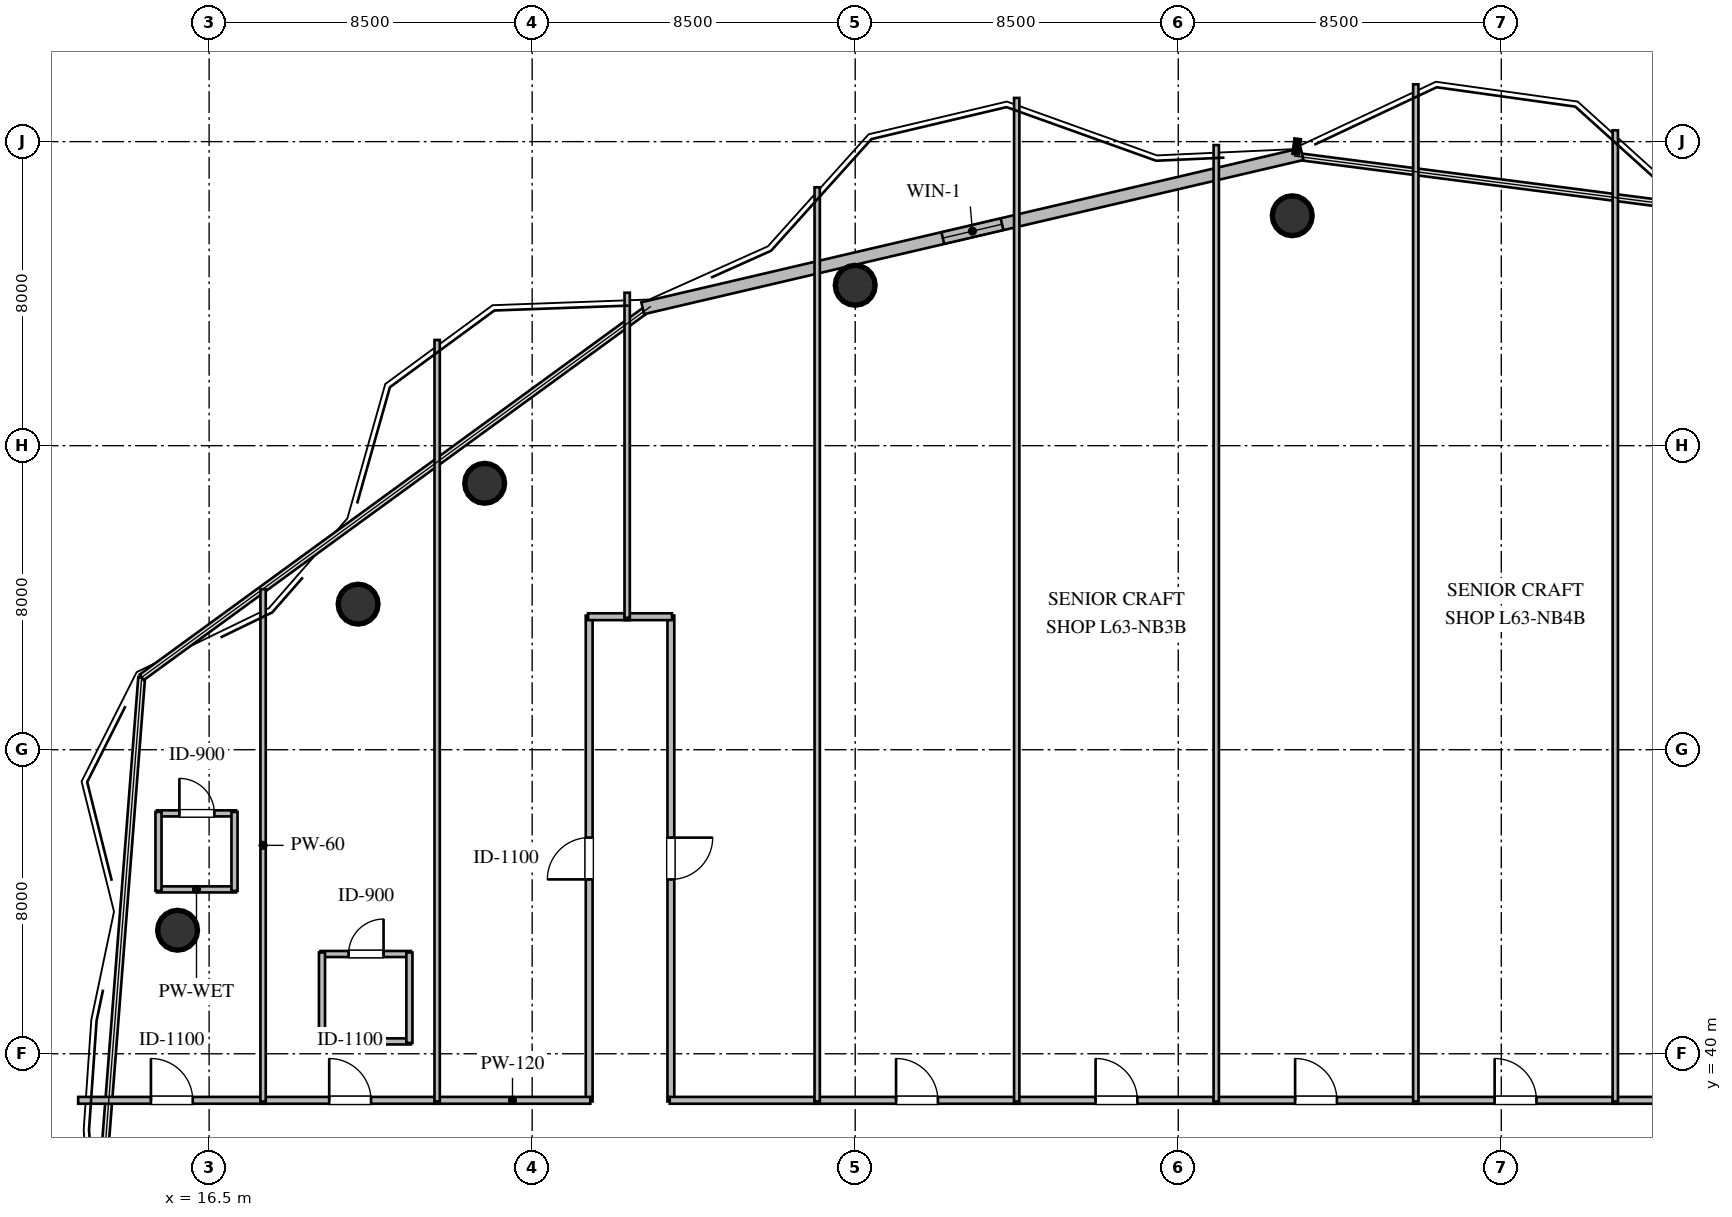
"""IFC4 building model, lengths in metres.
Left out: names, types, materials, properties, quantities, classifications, styles, units other than length and angle.
Written with IfcOpenShell. Run it as: python <this file> out.ifc"""

import sys

from ifc_helpers import new_model, si_unit, direction, frame, frame_2d, origin, origin_2d, place, context, subcontext, project, spatial, rectangle, circle, extrude, element, fill, save


model = new_model("IFC4")
c1 = context("Model", 3, precision=1e-05, world=origin(), true_north=direction((0.0, 1.0)))
c2 = subcontext(c1, "Body", "Model", "MODEL_VIEW")
j1 = project(units=[si_unit("LENGTHUNIT", "METRE"), si_unit("PLANEANGLEUNIT", "RADIAN")], contexts=[c1])
p1 = place(None, origin())
s1 = spatial("IfcSite", under=j1, at=p1, CompositionType="ELEMENT")
p2 = place(p1, origin())
s2 = spatial("IfcBuilding", under=s1, at=p2, CompositionType="ELEMENT")
p3 = place(p2, frame((0.0, 0.0, 238.8)))
s3 = spatial("IfcBuildingStorey", under=s2, at=p3, CompositionType="ELEMENT", Elevation=238.8)
for number, where, z_axis, x_axis in (
    (1, (45.0, 62.05, 0.0), (0.0, 0.0, 1.0), (1.0, 0.0, 0.0)),
    (2, (33.5, 60.22, 0.0), (0.0, 0.0, 1.0), (1.0, 0.0, 0.0)),
    (3, (23.75, 55.01, 0.0), (0.0, 0.0, 1.0), (1.0, 0.0, 0.0)),
    (4, (20.42, 51.83, 0.0), (0.0, 0.0, 1.0), (1.0, 0.0, 0.0)),
    (5, (15.67, 43.25, 0.0), (0.0, 0.0, 1.0), (1.0, 0.0, 0.0)),
):
    element("IfcColumn", number, at=place(p3, frame(where, z_axis=z_axis, x_axis=x_axis)), inside=s3, PredefinedType="COLUMN", context=c2, shape_type="SweptSolid", body=[
        extrude(circle(Radius=0.525, at=origin_2d()), origin(), (0.0, 0.0, 1.0), 3.6),
    ])
p4 = place(p3, frame((27.909, 59.617, 0.0), z_axis=(0.0, 0.0, 1.0), x_axis=(0.973753606594, 0.227604731158, 0.0)))
e6 = element("IfcWall", 6, at=p4, inside=s3, PredefinedType="STANDARD", context=c2, shape_type="SweptSolid", body=[
    extrude(rectangle(XDim=17.817, YDim=0.32, at=frame_2d((8.908, 0.0))), origin(), (0.0, 0.0, 1.0), 3.36),
])
p5 = place(p4, frame((8.109, 0.0, 1.05)))
e7 = element("IfcOpeningElement", 7, at=p5, cuts=e6, PredefinedType="OPENING", context=c2, shape_type="SweptSolid", body=[
    extrude(rectangle(XDim=1.6, YDim=1.5, at=frame_2d((0.8, 0.75))), frame((0.0, 0.17, 0.0), z_axis=(0.0, -1.0, 0.0), x_axis=(1.0, 0.0, 0.0)), (0.0, 0.0, 1.0), 0.34),
])
p6 = place(p3, frame((15.128, 44.325, 0.0), z_axis=(0.0, 0.0, 1.0), x_axis=(1.0, 0.0, 0.0)))
e8 = element("IfcWall", 8, at=p6, inside=s3, PredefinedType="PLUMBINGWALL", context=c2, shape_type="SweptSolid", body=[
    extrude(rectangle(XDim=2.08, YDim=0.16, at=frame_2d((1.04, 0.0))), origin(), (0.0, 0.0, 1.0), 3.36),
])
p7 = place(p3, frame((15.128, 46.325, 0.0), z_axis=(0.0, 0.0, 1.0), x_axis=(1.0, 0.0, 0.0)))
e9 = element("IfcWall", 9, at=p7, inside=s3, PredefinedType="PLUMBINGWALL", context=c2, shape_type="SweptSolid", body=[
    extrude(rectangle(XDim=2.08, YDim=0.16, at=frame_2d((1.04, 0.0))), origin(), (0.0, 0.0, 1.0), 3.36),
])
p8 = place(p7, frame((0.59, 0.0, 0.0)))
e10 = element("IfcOpeningElement", 10, at=p8, cuts=e9, PredefinedType="OPENING", context=c2, shape_type="SweptSolid", body=[
    extrude(rectangle(XDim=0.92, YDim=2.1, at=frame_2d((0.46, 1.05))), frame((0.0, 0.09, 0.0), z_axis=(0.0, -1.0, 0.0), x_axis=(1.0, 0.0, 0.0)), (0.0, 0.0, 1.0), 0.18),
])
for number, where, z_axis, x_axis in (
    (11, (15.168, 44.285, 0.0), (0.0, 0.0, 1.0), (0.0, 1.0, 0.0)),
    (12, (17.168, 44.285, 0.0), (0.0, 0.0, 1.0), (0.0, 1.0, 0.0)),
):
    element("IfcWall", number, at=place(p3, frame(where, z_axis=z_axis, x_axis=x_axis)), inside=s3, PredefinedType="PLUMBINGWALL", context=c2, shape_type="SweptSolid", body=[
        extrude(rectangle(XDim=2.08, YDim=0.16, at=frame_2d((1.04, 0.0))), origin(), (0.0, 0.0, 1.0), 3.36),
    ])
p9 = place(p3, frame((19.43, 40.325, 0.0), z_axis=(0.0, 0.0, 1.0), x_axis=(1.0, 0.0, 0.0)))
e13 = element("IfcWall", 13, at=p9, inside=s3, PredefinedType="PLUMBINGWALL", context=c2, shape_type="SweptSolid", body=[
    extrude(rectangle(XDim=2.38, YDim=0.16, at=frame_2d((1.19, 0.0))), origin(), (0.0, 0.0, 1.0), 3.36),
])
p10 = place(p3, frame((19.43, 42.625, 0.0), z_axis=(0.0, 0.0, 1.0), x_axis=(1.0, 0.0, 0.0)))
e14 = element("IfcWall", 14, at=p10, inside=s3, PredefinedType="PLUMBINGWALL", context=c2, shape_type="SweptSolid", body=[
    extrude(rectangle(XDim=2.38, YDim=0.16, at=frame_2d((1.19, 0.0))), origin(), (0.0, 0.0, 1.0), 3.36),
])
p11 = place(p10, frame((0.74, 0.0, 0.0)))
e15 = element("IfcOpeningElement", 15, at=p11, cuts=e14, PredefinedType="OPENING", context=c2, shape_type="SweptSolid", body=[
    extrude(rectangle(XDim=0.92, YDim=2.1, at=frame_2d((0.46, 1.05))), frame((0.0, 0.09, 0.0), z_axis=(0.0, -1.0, 0.0), x_axis=(1.0, 0.0, 0.0)), (0.0, 0.0, 1.0), 0.18),
])
p12 = place(p3, frame((19.47, 40.285, 0.0), z_axis=(0.0, 0.0, 1.0), x_axis=(0.0, 1.0, 0.0)))
e16 = element("IfcWall", 16, at=p12, inside=s3, PredefinedType="PLUMBINGWALL", context=c2, shape_type="SweptSolid", body=[
    extrude(rectangle(XDim=2.38, YDim=0.16, at=frame_2d((1.19, 0.0))), origin(), (0.0, 0.0, 1.0), 3.36),
])
p13 = place(p3, frame((21.77, 40.285, 0.0), z_axis=(0.0, 0.0, 1.0), x_axis=(0.0, 1.0, 0.0)))
e17 = element("IfcWall", 17, at=p13, inside=s3, PredefinedType="PLUMBINGWALL", context=c2, shape_type="SweptSolid", body=[
    extrude(rectangle(XDim=2.38, YDim=0.16, at=frame_2d((1.19, 0.0))), origin(), (0.0, 0.0, 1.0), 2.89),
])
p14 = place(p3, frame((13.054, 38.775, 0.0), z_axis=(0.0, 0.0, 1.0), x_axis=(1.0, 0.0, 0.0)))
e18 = element("IfcWall", 18, at=p14, inside=s3, PredefinedType="PARTITIONING", context=c2, shape_type="SweptSolid", body=[
    extrude(rectangle(XDim=4.931, YDim=0.18, at=frame_2d((2.466, 0.0))), origin(), (0.0, 0.0, 1.0), 3.36),
])
p15 = place(p14, frame((1.915, 0.0, 0.0)))
e19 = element("IfcOpeningElement", 19, at=p15, cuts=e18, PredefinedType="OPENING", context=c2, shape_type="SweptSolid", body=[
    extrude(rectangle(XDim=1.1, YDim=2.1, at=frame_2d((0.55, 1.05))), frame((0.0, 0.1, 0.0), z_axis=(0.0, -1.0, 0.0), x_axis=(1.0, 0.0, 0.0)), (0.0, 0.0, 1.0), 0.2),
])
p16 = place(p3, frame((17.855, 38.775, 0.0), z_axis=(0.0, 0.0, 1.0), x_axis=(1.0, 0.0, 0.0)))
e20 = element("IfcWall", 20, at=p16, inside=s3, PredefinedType="PARTITIONING", context=c2, shape_type="SweptSolid", body=[
    extrude(rectangle(XDim=4.71, YDim=0.18, at=frame_2d((2.355, 0.0))), origin(), (0.0, 0.0, 1.0), 3.36),
])
p17 = place(p16, frame((1.805, 0.0, 0.0)))
e21 = element("IfcOpeningElement", 21, at=p17, cuts=e20, PredefinedType="OPENING", context=c2, shape_type="SweptSolid", body=[
    extrude(rectangle(XDim=1.1, YDim=2.1, at=frame_2d((0.55, 1.05))), frame((0.0, 0.1, 0.0), z_axis=(0.0, -1.0, 0.0), x_axis=(1.0, 0.0, 0.0)), (0.0, 0.0, 1.0), 0.2),
])
p18 = place(p3, frame((26.5, 38.745, 0.0), z_axis=(0.0, 0.0, 1.0), x_axis=(0.0, 1.0, 0.0)))
e22 = element("IfcWall", 22, at=p18, inside=s3, PredefinedType="PARTITIONING", context=c2, shape_type="SweptSolid", body=[
    extrude(rectangle(XDim=12.785, YDim=0.18, at=frame_2d((6.393, 0.0))), origin(), (0.0, 0.0, 1.0), 3.36),
])
p19 = place(p18, frame((5.843, 0.0, 0.0)))
e23 = element("IfcOpeningElement", 23, at=p19, cuts=e22, PredefinedType="OPENING", context=c2, shape_type="SweptSolid", body=[
    extrude(rectangle(XDim=1.1, YDim=2.1, at=frame_2d((0.55, 1.05))), frame((0.0, 0.1, 0.0), z_axis=(0.0, -1.0, 0.0), x_axis=(1.0, 0.0, 0.0)), (0.0, 0.0, 1.0), 0.2),
])
p20 = place(p3, frame((22.435, 38.775, 0.0), z_axis=(0.0, 0.0, 1.0), x_axis=(1.0, 0.0, 0.0)))
e24 = element("IfcWall", 24, at=p20, inside=s3, PredefinedType="PARTITIONING", context=c2, shape_type="SweptSolid", body=[
    extrude(rectangle(XDim=4.095, YDim=0.18, at=frame_2d((2.047, 0.0))), origin(), (0.0, 0.0, 1.0), 3.36),
])
p21 = place(p3, frame((26.47, 51.5, 0.0), z_axis=(0.0, 0.0, 1.0), x_axis=(1.0, 0.0, 0.0)))
e25 = element("IfcWall", 25, at=p21, inside=s3, PredefinedType="PARTITIONING", context=c2, shape_type="SweptSolid", body=[
    extrude(rectangle(XDim=1.095, YDim=0.18, at=frame_2d((0.547, 0.0))), origin(), (0.0, 0.0, 1.0), 3.36),
])
p22 = place(p3, frame((28.65, 51.53, 0.0), z_axis=(0.0, 0.0, 1.0), x_axis=(0.0, -1.0, 0.0)))
e26 = element("IfcWall", 26, at=p22, inside=s3, PredefinedType="PARTITIONING", context=c2, shape_type="SweptSolid", body=[
    extrude(rectangle(XDim=12.785, YDim=0.18, at=frame_2d((6.393, 0.0))), origin(), (0.0, 0.0, 1.0), 3.36),
])
p23 = place(p22, frame((5.843, 0.0, 0.0)))
e27 = element("IfcOpeningElement", 27, at=p23, cuts=e26, PredefinedType="OPENING", context=c2, shape_type="SweptSolid", body=[
    extrude(rectangle(XDim=1.1, YDim=2.1, at=frame_2d((0.55, 1.05))), frame((0.0, 0.1, 0.0), z_axis=(0.0, -1.0, 0.0), x_axis=(1.0, 0.0, 0.0)), (0.0, 0.0, 1.0), 0.2),
])
p24 = place(p3, frame((28.62, 38.775, 0.0), z_axis=(0.0, 0.0, 1.0), x_axis=(1.0, 0.0, 0.0)))
e28 = element("IfcWall", 28, at=p24, inside=s3, PredefinedType="PARTITIONING", context=c2, shape_type="SweptSolid", body=[
    extrude(rectangle(XDim=3.945, YDim=0.18, at=frame_2d((1.972, 0.0))), origin(), (0.0, 0.0, 1.0), 3.36),
])
p25 = place(p3, frame((27.435, 51.5, 0.0), z_axis=(0.0, 0.0, 1.0), x_axis=(1.0, 0.0, 0.0)))
e29 = element("IfcWall", 29, at=p25, inside=s3, PredefinedType="PARTITIONING", context=c2, shape_type="SweptSolid", body=[
    extrude(rectangle(XDim=1.245, YDim=0.18, at=frame_2d((0.623, 0.0))), origin(), (0.0, 0.0, 1.0), 3.36),
])
p26 = place(p3, frame((32.435, 38.775, 0.0), z_axis=(0.0, 0.0, 1.0), x_axis=(1.0, 0.0, 0.0)))
e30 = element("IfcWall", 30, at=p26, inside=s3, PredefinedType="PARTITIONING", context=c2, shape_type="SweptSolid", body=[
    extrude(rectangle(XDim=5.38, YDim=0.18, at=frame_2d((2.69, 0.0))), origin(), (0.0, 0.0, 1.0), 3.36),
])
p27 = place(p26, frame((2.14, 0.0, 0.0)))
e31 = element("IfcOpeningElement", 31, at=p27, cuts=e30, PredefinedType="OPENING", context=c2, shape_type="SweptSolid", body=[
    extrude(rectangle(XDim=1.1, YDim=2.1, at=frame_2d((0.55, 1.05))), frame((0.0, 0.1, 0.0), z_axis=(0.0, -1.0, 0.0), x_axis=(1.0, 0.0, 0.0)), (0.0, 0.0, 1.0), 0.2),
])
p28 = place(p3, frame((37.685, 38.775, 0.0), z_axis=(0.0, 0.0, 1.0), x_axis=(1.0, 0.0, 0.0)))
e32 = element("IfcWall", 32, at=p28, inside=s3, PredefinedType="PARTITIONING", context=c2, shape_type="SweptSolid", body=[
    extrude(rectangle(XDim=5.38, YDim=0.18, at=frame_2d((2.69, 0.0))), origin(), (0.0, 0.0, 1.0), 3.36),
])
p29 = place(p28, frame((2.14, 0.0, 0.0)))
e33 = element("IfcOpeningElement", 33, at=p29, cuts=e32, PredefinedType="OPENING", context=c2, shape_type="SweptSolid", body=[
    extrude(rectangle(XDim=1.1, YDim=2.1, at=frame_2d((0.55, 1.05))), frame((0.0, 0.1, 0.0), z_axis=(0.0, -1.0, 0.0), x_axis=(1.0, 0.0, 0.0)), (0.0, 0.0, 1.0), 0.2),
])
p30 = place(p3, frame((42.935, 38.775, 0.0), z_axis=(0.0, 0.0, 1.0), x_axis=(1.0, 0.0, 0.0)))
e34 = element("IfcWall", 34, at=p30, inside=s3, PredefinedType="PARTITIONING", context=c2, shape_type="SweptSolid", body=[
    extrude(rectangle(XDim=5.38, YDim=0.18, at=frame_2d((2.69, 0.0))), origin(), (0.0, 0.0, 1.0), 3.36),
])
p31 = place(p30, frame((2.14, 0.0, 0.0)))
e35 = element("IfcOpeningElement", 35, at=p31, cuts=e34, PredefinedType="OPENING", context=c2, shape_type="SweptSolid", body=[
    extrude(rectangle(XDim=1.1, YDim=2.1, at=frame_2d((0.55, 1.05))), frame((0.0, 0.1, 0.0), z_axis=(0.0, -1.0, 0.0), x_axis=(1.0, 0.0, 0.0)), (0.0, 0.0, 1.0), 0.2),
])
p32 = place(p3, frame((48.185, 38.775, 0.0), z_axis=(0.0, 0.0, 1.0), x_axis=(1.0, 0.0, 0.0)))
e36 = element("IfcWall", 36, at=p32, inside=s3, PredefinedType="PARTITIONING", context=c2, shape_type="SweptSolid", body=[
    extrude(rectangle(XDim=5.38, YDim=0.18, at=frame_2d((2.69, 0.0))), origin(), (0.0, 0.0, 1.0), 3.36),
])
p33 = place(p32, frame((2.14, 0.0, 0.0)))
e37 = element("IfcOpeningElement", 37, at=p33, cuts=e36, PredefinedType="OPENING", context=c2, shape_type="SweptSolid", body=[
    extrude(rectangle(XDim=1.1, YDim=2.1, at=frame_2d((0.55, 1.05))), frame((0.0, 0.1, 0.0), z_axis=(0.0, -1.0, 0.0), x_axis=(1.0, 0.0, 0.0)), (0.0, 0.0, 1.0), 0.2),
])
p34 = place(p3, frame((53.435, 38.775, 0.0), z_axis=(0.0, 0.0, 1.0), x_axis=(1.0, 0.0, 0.0)))
e38 = element("IfcWall", 38, at=p34, inside=s3, PredefinedType="PARTITIONING", context=c2, shape_type="SweptSolid", body=[
    extrude(rectangle(XDim=4.88, YDim=0.18, at=frame_2d((2.44, 0.0))), origin(), (0.0, 0.0, 1.0), 3.36),
])
p35 = place(p34, frame((1.89, 0.0, 0.0)))
e39 = element("IfcOpeningElement", 39, at=p35, cuts=e38, PredefinedType="OPENING", context=c2, shape_type="SweptSolid", body=[
    extrude(rectangle(XDim=1.1, YDim=2.1, at=frame_2d((0.55, 1.05))), frame((0.0, 0.1, 0.0), z_axis=(0.0, -1.0, 0.0), x_axis=(1.0, 0.0, 0.0)), (0.0, 0.0, 1.0), 0.2),
])
p36 = place(p3, frame((17.92, 52.222, 0.0), z_axis=(0.0, 0.0, 1.0), x_axis=(0.0, -1.0, 0.0)))
e40 = element("IfcWall", 40, at=p36, inside=s3, PredefinedType="PARTITIONING", context=c2, shape_type="SweptSolid", body=[
    extrude(rectangle(XDim=13.477, YDim=0.14, at=frame_2d((6.739, 0.0))), origin(), (0.0, 0.0, 1.0), 3.36),
])
p37 = place(p3, frame((22.5, 58.782, 0.0), z_axis=(0.0, 0.0, 1.0), x_axis=(0.0, -1.0, 0.0)))
e41 = element("IfcWall", 41, at=p37, inside=s3, PredefinedType="PARTITIONING", context=c2, shape_type="SweptSolid", body=[
    extrude(rectangle(XDim=20.037, YDim=0.14, at=frame_2d((10.019, 0.0))), origin(), (0.0, 0.0, 1.0), 2.89),
])
p38 = place(p3, frame((27.5, 60.024, 0.0), z_axis=(0.0, 0.0, 1.0), x_axis=(0.0, -1.0, 0.0)))
e42 = element("IfcWall", 42, at=p38, inside=s3, PredefinedType="PARTITIONING", context=c2, shape_type="SweptSolid", body=[
    extrude(rectangle(XDim=8.554, YDim=0.14, at=frame_2d((4.277, 0.0))), origin(), (0.0, 0.0, 1.0), 3.36),
])
p39 = place(p3, frame((32.5, 62.799, 0.0), z_axis=(0.0, 0.0, 1.0), x_axis=(0.0, -1.0, 0.0)))
e43 = element("IfcWall", 43, at=p39, inside=s3, PredefinedType="PARTITIONING", context=c2, shape_type="SweptSolid", body=[
    extrude(rectangle(XDim=24.054, YDim=0.14, at=frame_2d((12.027, 0.0))), origin(), (0.0, 0.0, 1.0), 3.36),
])
p40 = place(p3, frame((37.75, 65.15, 0.0), z_axis=(0.0, 0.0, 1.0), x_axis=(0.0, -1.0, 0.0)))
e44 = element("IfcWall", 44, at=p40, inside=s3, PredefinedType="PARTITIONING", context=c2, shape_type="SweptSolid", body=[
    extrude(rectangle(XDim=26.405, YDim=0.14, at=frame_2d((13.202, 0.0))), origin(), (0.0, 0.0, 1.0), 3.36),
])
p41 = place(p3, frame((43.0, 63.909, 0.0), z_axis=(0.0, 0.0, 1.0), x_axis=(0.0, -1.0, 0.0)))
e45 = element("IfcWall", 45, at=p41, inside=s3, PredefinedType="PARTITIONING", context=c2, shape_type="SweptSolid", body=[
    extrude(rectangle(XDim=25.164, YDim=0.14, at=frame_2d((12.582, 0.0))), origin(), (0.0, 0.0, 1.0), 3.36),
])
p42 = place(p3, frame((48.25, 65.508, 0.0), z_axis=(0.0, 0.0, 1.0), x_axis=(0.0, -1.0, 0.0)))
e46 = element("IfcWall", 46, at=p42, inside=s3, PredefinedType="PARTITIONING", context=c2, shape_type="SweptSolid", body=[
    extrude(rectangle(XDim=26.763, YDim=0.14, at=frame_2d((13.381, 0.0))), origin(), (0.0, 0.0, 1.0), 3.36),
])
p43 = place(p3, frame((53.5, 64.298, 0.0), z_axis=(0.0, 0.0, 1.0), x_axis=(0.0, -1.0, 0.0)))
e47 = element("IfcWall", 47, at=p43, inside=s3, PredefinedType="PARTITIONING", context=c2, shape_type="SweptSolid", body=[
    extrude(rectangle(XDim=25.553, YDim=0.14, at=frame_2d((12.776, 0.0))), origin(), (0.0, 0.0, 1.0), 3.36),
])
p44 = place(p5, origin())
e48 = element("IfcWindow", 48, at=p44, inside=s3, PartitioningType="SINGLE_PANEL", PredefinedType="WINDOW", context=c2, shape_type="SweptSolid", body=[
    extrude(rectangle(XDim=1.6, YDim=1.5, at=frame_2d((0.8, 0.75))), frame((0.0, 0.03, 0.0), z_axis=(0.0, -1.0, 0.0), x_axis=(1.0, 0.0, 0.0)), (0.0, 0.0, 1.0), 0.06),
])
fill(e7, e48)
p45 = place(p8, origin())
e49 = element("IfcDoor", 49, at=p45, inside=s3, OperationType="SINGLE_SWING_LEFT", PredefinedType="DOOR", context=c2, shape_type="SweptSolid", body=[
    extrude(rectangle(XDim=0.92, YDim=2.1, at=frame_2d((0.46, 1.05))), frame((0.0, 0.025, 0.0), z_axis=(0.0, -1.0, 0.0), x_axis=(1.0, 0.0, 0.0)), (0.0, 0.0, 1.0), 0.05),
])
fill(e10, e49)
p46 = place(p11, origin())
e50 = element("IfcDoor", 50, at=p46, inside=s3, OperationType="SINGLE_SWING_RIGHT", PredefinedType="DOOR", context=c2, shape_type="SweptSolid", body=[
    extrude(rectangle(XDim=0.92, YDim=2.1, at=frame_2d((0.46, 1.05))), frame((0.0, 0.025, 0.0), z_axis=(0.0, -1.0, 0.0), x_axis=(1.0, 0.0, 0.0)), (0.0, 0.0, 1.0), 0.05),
])
fill(e15, e50)
p47 = place(p15, origin())
e51 = element("IfcDoor", 51, at=p47, inside=s3, OperationType="SINGLE_SWING_LEFT", PredefinedType="DOOR", context=c2, shape_type="SweptSolid", body=[
    extrude(rectangle(XDim=1.1, YDim=2.1, at=frame_2d((0.55, 1.05))), frame((0.0, 0.025, 0.0), z_axis=(0.0, -1.0, 0.0), x_axis=(1.0, 0.0, 0.0)), (0.0, 0.0, 1.0), 0.05),
])
fill(e19, e51)
p48 = place(p17, origin())
e52 = element("IfcDoor", 52, at=p48, inside=s3, OperationType="SINGLE_SWING_LEFT", PredefinedType="DOOR", context=c2, shape_type="SweptSolid", body=[
    extrude(rectangle(XDim=1.1, YDim=2.1, at=frame_2d((0.55, 1.05))), frame((0.0, 0.025, 0.0), z_axis=(0.0, -1.0, 0.0), x_axis=(1.0, 0.0, 0.0)), (0.0, 0.0, 1.0), 0.05),
])
fill(e21, e52)
p49 = place(p19, origin())
e53 = element("IfcDoor", 53, at=p49, inside=s3, OperationType="SINGLE_SWING_LEFT", PredefinedType="DOOR", context=c2, shape_type="SweptSolid", body=[
    extrude(rectangle(XDim=1.1, YDim=2.1, at=frame_2d((0.55, 1.05))), frame((0.0, 0.025, 0.0), z_axis=(0.0, -1.0, 0.0), x_axis=(1.0, 0.0, 0.0)), (0.0, 0.0, 1.0), 0.05),
])
fill(e23, e53)
p50 = place(p23, origin())
e54 = element("IfcDoor", 54, at=p50, inside=s3, OperationType="SINGLE_SWING_LEFT", PredefinedType="DOOR", context=c2, shape_type="SweptSolid", body=[
    extrude(rectangle(XDim=1.1, YDim=2.1, at=frame_2d((0.55, 1.05))), frame((0.0, 0.025, 0.0), z_axis=(0.0, -1.0, 0.0), x_axis=(1.0, 0.0, 0.0)), (0.0, 0.0, 1.0), 0.05),
])
fill(e27, e54)
p51 = place(p27, origin())
e55 = element("IfcDoor", 55, at=p51, inside=s3, OperationType="SINGLE_SWING_LEFT", PredefinedType="DOOR", context=c2, shape_type="SweptSolid", body=[
    extrude(rectangle(XDim=1.1, YDim=2.1, at=frame_2d((0.55, 1.05))), frame((0.0, 0.025, 0.0), z_axis=(0.0, -1.0, 0.0), x_axis=(1.0, 0.0, 0.0)), (0.0, 0.0, 1.0), 0.05),
])
fill(e31, e55)
p52 = place(p29, origin())
e56 = element("IfcDoor", 56, at=p52, inside=s3, OperationType="SINGLE_SWING_LEFT", PredefinedType="DOOR", context=c2, shape_type="SweptSolid", body=[
    extrude(rectangle(XDim=1.1, YDim=2.1, at=frame_2d((0.55, 1.05))), frame((0.0, 0.025, 0.0), z_axis=(0.0, -1.0, 0.0), x_axis=(1.0, 0.0, 0.0)), (0.0, 0.0, 1.0), 0.05),
])
fill(e33, e56)
p53 = place(p31, origin())
e57 = element("IfcDoor", 57, at=p53, inside=s3, OperationType="SINGLE_SWING_LEFT", PredefinedType="DOOR", context=c2, shape_type="SweptSolid", body=[
    extrude(rectangle(XDim=1.1, YDim=2.1, at=frame_2d((0.55, 1.05))), frame((0.0, 0.025, 0.0), z_axis=(0.0, -1.0, 0.0), x_axis=(1.0, 0.0, 0.0)), (0.0, 0.0, 1.0), 0.05),
])
fill(e35, e57)
p54 = place(p33, origin())
e58 = element("IfcDoor", 58, at=p54, inside=s3, OperationType="SINGLE_SWING_LEFT", PredefinedType="DOOR", context=c2, shape_type="SweptSolid", body=[
    extrude(rectangle(XDim=1.1, YDim=2.1, at=frame_2d((0.55, 1.05))), frame((0.0, 0.025, 0.0), z_axis=(0.0, -1.0, 0.0), x_axis=(1.0, 0.0, 0.0)), (0.0, 0.0, 1.0), 0.05),
])
fill(e37, e58)
save(model, sys.argv[1])
